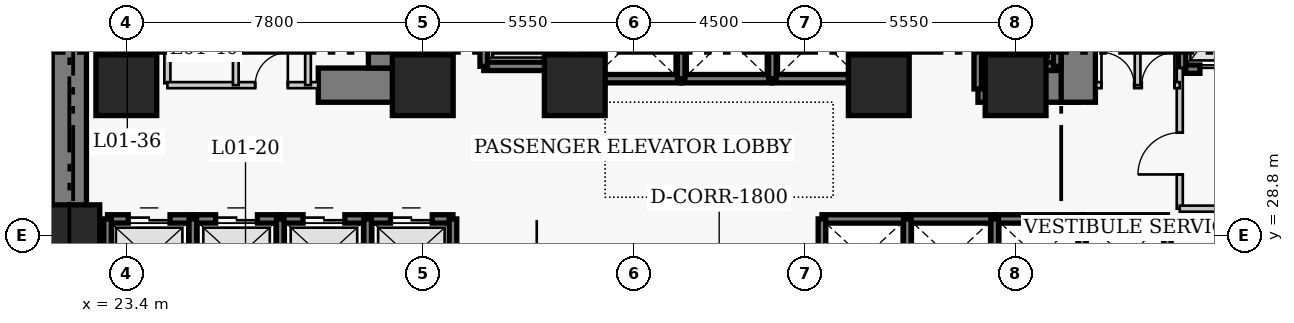
"""IFC4 building model, lengths in metres.
Left out: names, types, materials, properties, quantities, classifications, styles, units other than length and angle.
Written with IfcOpenShell. Run it as: python <this file> out.ifc"""

import sys

from ifc_helpers import new_model, si_unit, direction, frame, frame_2d, origin, origin_2d, place, context, subcontext, project, spatial, rectangle, extrude, element, fill, save


model = new_model("IFC4")
c1 = context("Model", 3, precision=1e-05, world=origin(), true_north=direction((0.0, 1.0)))
c2 = subcontext(c1, "Body", "Model", "MODEL_VIEW")
j1 = project(units=[si_unit("LENGTHUNIT", "METRE"), si_unit("PLANEANGLEUNIT", "RADIAN")], contexts=[c1])
p1 = place(None, origin())
s1 = spatial("IfcSite", under=j1, at=p1, CompositionType="ELEMENT")
p2 = place(p1, origin())
s2 = spatial("IfcBuilding", under=s1, at=p2, CompositionType="ELEMENT")
p3 = place(p2, frame((0.0, 0.0, 5.4)))
s3 = spatial("IfcBuildingStorey", under=s2, at=p3, CompositionType="ELEMENT", Elevation=5.4)
p4 = place(p3, frame((21.9, 27.05, 0.0), z_axis=(0.0, 0.0, 1.0), x_axis=(0.0, 1.0, 0.0)))
e1 = element("IfcWall", 1, at=p4, inside=s3, PredefinedType="SHEAR", context=c2, shape_type="SweptSolid", body=[
    extrude(rectangle(XDim=13.72, YDim=0.9, at=frame_2d((6.86, 0.0))), origin(), (0.0, 0.0, 1.0), 5.0),
])
p5 = place(p3, frame((28.45, 32.75, 0.0), z_axis=(0.0, 0.0, 1.0), x_axis=(1.0, 0.0, 0.0)))
e2 = element("IfcWall", 2, at=p5, inside=s3, PredefinedType="SHEAR", context=c2, shape_type="SweptSolid", body=[
    extrude(rectangle(XDim=2.4, YDim=0.9, at=frame_2d((1.2, 0.0))), origin(), (0.0, 0.0, 1.0), 5.0),
])
p6 = place(p3, frame((45.81, 32.75, 0.0), z_axis=(0.0, 0.0, 1.0), x_axis=(1.0, 0.0, 0.0)))
e3 = element("IfcWall", 3, at=p6, inside=s3, PredefinedType="SHEAR", context=c2, shape_type="SweptSolid", body=[
    extrude(rectangle(XDim=2.64, YDim=0.9, at=frame_2d((1.32, 0.0))), origin(), (0.0, 0.0, 1.0), 5.0),
])
p7 = place(p3, frame((30.22, 33.2, 0.0), z_axis=(0.0, 0.0, 1.0), x_axis=(0.0, 1.0, 0.0)))
e4 = element("IfcWall", 4, at=p7, inside=s3, PredefinedType="SHEAR", context=c2, shape_type="SweptSolid", body=[
    extrude(rectangle(XDim=7.12, YDim=0.9, at=frame_2d((3.56, 0.0))), origin(), (0.0, 0.0, 1.0), 5.0),
])
p8 = place(p3, frame((48.45, 32.3, 0.0), z_axis=(0.0, 0.0, 1.0), x_axis=(0.0, 1.0, 0.0)))
e5 = element("IfcWall", 5, at=p8, inside=s3, PredefinedType="SHEAR", context=c2, shape_type="SweptSolid", body=[
    extrude(rectangle(XDim=8.02, YDim=0.9, at=frame_2d((4.01, 0.0))), origin(), (0.0, 0.0, 1.0), 5.0),
])
p9 = place(p8, frame((5.9, 0.0, 0.0)))
e6 = element("IfcOpeningElement", 6, at=p9, cuts=e5, PredefinedType="OPENING", context=c2, shape_type="SweptSolid", body=[
    extrude(rectangle(XDim=1.1, YDim=2.15, at=frame_2d((0.55, 1.075))), frame((0.0, 0.46, 0.0), z_axis=(0.0, -1.0, 0.0), x_axis=(1.0, 0.0, 0.0)), (0.0, 0.0, 1.0), 0.92),
])
for number, where, z_axis, x_axis in (
    (7, (21.9, 28.8, 0.0), (0.0, 0.0, 1.0), (1.0, 0.0, 0.0)),
    (8, (23.4, 32.75, 0.0), (0.0, 0.0, 1.0), (1.0, 0.0, 0.0)),
    (9, (31.2, 32.75, 0.0), (0.0, 0.0, 1.0), (1.0, 0.0, 0.0)),
    (10, (35.2, 32.75, 0.0), (0.0, 0.0, 1.0), (1.0, 0.0, 0.0)),
    (11, (43.2, 32.75, 0.0), (0.0, 0.0, 1.0), (1.0, 0.0, 0.0)),
    (12, (46.8, 32.75, 0.0), (0.0, 0.0, 1.0), (1.0, 0.0, 0.0)),
):
    element("IfcColumn", number, at=place(p3, frame(where, z_axis=z_axis, x_axis=x_axis)), inside=s3, PredefinedType="COLUMN", context=c2, shape_type="SweptSolid", body=[
        extrude(rectangle(XDim=1.6, YDim=1.6, at=origin_2d()), origin(), (0.0, 0.0, 1.0), 5.0),
    ])
p10 = place(p3, frame((22.905, 29.23, 0.0), z_axis=(0.0, 0.0, 1.0), x_axis=(1.0, 0.0, 0.0)))
e13 = element("IfcWall", 13, at=p10, inside=s3, PredefinedType="SHEAR", context=c2, shape_type="SweptSolid", body=[
    extrude(rectangle(XDim=2.245, YDim=0.22, at=frame_2d((1.123, 0.0))), origin(), (0.0, 0.0, 1.0), 5.0),
])
p11 = place(p10, frame((0.545, 0.0, 0.0)))
e14 = element("IfcOpeningElement", 14, at=p11, cuts=e13, PredefinedType="OPENING", context=c2, shape_type="SweptSolid", body=[
    extrude(rectangle(XDim=1.1, YDim=2.15, at=frame_2d((0.55, 1.075))), frame((0.0, 0.12, 0.0), z_axis=(0.0, -1.0, 0.0), x_axis=(1.0, 0.0, 0.0)), (0.0, 0.0, 1.0), 0.24),
])
p12 = place(p3, frame((22.905, 27.17, 0.0), z_axis=(0.0, 0.0, 1.0), x_axis=(0.0, 1.0, 0.0)))
e15 = element("IfcWall", 15, at=p12, inside=s3, PredefinedType="SHEAR", context=c2, shape_type="SweptSolid", body=[
    extrude(rectangle(XDim=2.06, YDim=0.2, at=frame_2d((1.03, 0.0))), origin(), (0.0, 0.0, 1.0), 5.0),
])
p13 = place(p3, frame((25.15, 29.23, 0.0), z_axis=(0.0, 0.0, 1.0), x_axis=(1.0, 0.0, 0.0)))
e16 = element("IfcWall", 16, at=p13, inside=s3, PredefinedType="SHEAR", context=c2, shape_type="SweptSolid", body=[
    extrude(rectangle(XDim=2.3, YDim=0.22, at=frame_2d((1.15, 0.0))), origin(), (0.0, 0.0, 1.0), 5.0),
])
p14 = place(p13, frame((0.6, 0.0, 0.0)))
e17 = element("IfcOpeningElement", 17, at=p14, cuts=e16, PredefinedType="OPENING", context=c2, shape_type="SweptSolid", body=[
    extrude(rectangle(XDim=1.1, YDim=2.15, at=frame_2d((0.55, 1.075))), frame((0.0, 0.12, 0.0), z_axis=(0.0, -1.0, 0.0), x_axis=(1.0, 0.0, 0.0)), (0.0, 0.0, 1.0), 0.24),
])
p15 = place(p3, frame((25.15, 27.17, 0.0), z_axis=(0.0, 0.0, 1.0), x_axis=(0.0, 1.0, 0.0)))
e18 = element("IfcWall", 18, at=p15, inside=s3, PredefinedType="SHEAR", context=c2, shape_type="SweptSolid", body=[
    extrude(rectangle(XDim=2.06, YDim=0.2, at=frame_2d((1.03, 0.0))), origin(), (0.0, 0.0, 1.0), 5.0),
])
p16 = place(p3, frame((27.45, 29.23, 0.0), z_axis=(0.0, 0.0, 1.0), x_axis=(1.0, 0.0, 0.0)))
e19 = element("IfcWall", 19, at=p16, inside=s3, PredefinedType="SHEAR", context=c2, shape_type="SweptSolid", body=[
    extrude(rectangle(XDim=2.3, YDim=0.22, at=frame_2d((1.15, 0.0))), origin(), (0.0, 0.0, 1.0), 5.0),
])
p17 = place(p16, frame((0.6, 0.0, 0.0)))
e20 = element("IfcOpeningElement", 20, at=p17, cuts=e19, PredefinedType="OPENING", context=c2, shape_type="SweptSolid", body=[
    extrude(rectangle(XDim=1.1, YDim=2.15, at=frame_2d((0.55, 1.075))), frame((0.0, 0.12, 0.0), z_axis=(0.0, -1.0, 0.0), x_axis=(1.0, 0.0, 0.0)), (0.0, 0.0, 1.0), 0.24),
])
p18 = place(p3, frame((27.45, 27.17, 0.0), z_axis=(0.0, 0.0, 1.0), x_axis=(0.0, 1.0, 0.0)))
e21 = element("IfcWall", 21, at=p18, inside=s3, PredefinedType="SHEAR", context=c2, shape_type="SweptSolid", body=[
    extrude(rectangle(XDim=2.06, YDim=0.2, at=frame_2d((1.03, 0.0))), origin(), (0.0, 0.0, 1.0), 5.0),
])
p19 = place(p3, frame((29.75, 29.23, 0.0), z_axis=(0.0, 0.0, 1.0), x_axis=(1.0, 0.0, 0.0)))
e22 = element("IfcWall", 22, at=p19, inside=s3, PredefinedType="SHEAR", context=c2, shape_type="SweptSolid", body=[
    extrude(rectangle(XDim=2.245, YDim=0.22, at=frame_2d((1.123, 0.0))), origin(), (0.0, 0.0, 1.0), 5.0),
])
p20 = place(p19, frame((0.6, 0.0, 0.0)))
e23 = element("IfcOpeningElement", 23, at=p20, cuts=e22, PredefinedType="OPENING", context=c2, shape_type="SweptSolid", body=[
    extrude(rectangle(XDim=1.1, YDim=2.15, at=frame_2d((0.55, 1.075))), frame((0.0, 0.12, 0.0), z_axis=(0.0, -1.0, 0.0), x_axis=(1.0, 0.0, 0.0)), (0.0, 0.0, 1.0), 0.24),
])
for number, where, z_axis, x_axis in (
    (24, (29.75, 27.17, 0.0), (0.0, 0.0, 1.0), (0.0, 1.0, 0.0)),
    (25, (31.995, 27.17, 0.0), (0.0, 0.0, 1.0), (0.0, 1.0, 0.0)),
):
    element("IfcWall", number, at=place(p3, frame(where, z_axis=z_axis, x_axis=x_axis)), inside=s3, PredefinedType="SHEAR", context=c2, shape_type="SweptSolid", body=[
        extrude(rectangle(XDim=2.06, YDim=0.2, at=frame_2d((1.03, 0.0))), origin(), (0.0, 0.0, 1.0), 5.0),
    ])
p21 = place(p3, frame((41.705, 29.23, 0.0), z_axis=(0.0, 0.0, 1.0), x_axis=(1.0, 0.0, 0.0)))
e26 = element("IfcWall", 26, at=p21, inside=s3, PredefinedType="SHEAR", context=c2, shape_type="SweptSolid", body=[
    extrude(rectangle(XDim=2.245, YDim=0.22, at=frame_2d((1.123, 0.0))), origin(), (0.0, 0.0, 1.0), 5.0),
])
p22 = place(p3, frame((41.705, 27.17, 0.0), z_axis=(0.0, 0.0, 1.0), x_axis=(0.0, 1.0, 0.0)))
e27 = element("IfcWall", 27, at=p22, inside=s3, PredefinedType="SHEAR", context=c2, shape_type="SweptSolid", body=[
    extrude(rectangle(XDim=2.06, YDim=0.2, at=frame_2d((1.03, 0.0))), origin(), (0.0, 0.0, 1.0), 5.0),
])
p23 = place(p3, frame((43.95, 29.23, 0.0), z_axis=(0.0, 0.0, 1.0), x_axis=(1.0, 0.0, 0.0)))
e28 = element("IfcWall", 28, at=p23, inside=s3, PredefinedType="SHEAR", context=c2, shape_type="SweptSolid", body=[
    extrude(rectangle(XDim=2.3, YDim=0.22, at=frame_2d((1.15, 0.0))), origin(), (0.0, 0.0, 1.0), 5.0),
])
p24 = place(p3, frame((43.95, 27.17, 0.0), z_axis=(0.0, 0.0, 1.0), x_axis=(0.0, 1.0, 0.0)))
e29 = element("IfcWall", 29, at=p24, inside=s3, PredefinedType="SHEAR", context=c2, shape_type="SweptSolid", body=[
    extrude(rectangle(XDim=2.06, YDim=0.2, at=frame_2d((1.03, 0.0))), origin(), (0.0, 0.0, 1.0), 5.0),
])
p25 = place(p3, frame((46.25, 29.23, 0.0), z_axis=(0.0, 0.0, 1.0), x_axis=(1.0, 0.0, 0.0)))
e30 = element("IfcWall", 30, at=p25, inside=s3, PredefinedType="SHEAR", context=c2, shape_type="SweptSolid", body=[
    extrude(rectangle(XDim=2.3, YDim=0.22, at=frame_2d((1.15, 0.0))), origin(), (0.0, 0.0, 1.0), 5.0),
])
p26 = place(p3, frame((46.25, 27.17, 0.0), z_axis=(0.0, 0.0, 1.0), x_axis=(0.0, 1.0, 0.0)))
e31 = element("IfcWall", 31, at=p26, inside=s3, PredefinedType="SHEAR", context=c2, shape_type="SweptSolid", body=[
    extrude(rectangle(XDim=2.06, YDim=0.2, at=frame_2d((1.03, 0.0))), origin(), (0.0, 0.0, 1.0), 5.0),
])
p27 = place(p3, frame((48.55, 29.23, 0.0), z_axis=(0.0, 0.0, 1.0), x_axis=(1.0, 0.0, 0.0)))
e32 = element("IfcWall", 32, at=p27, inside=s3, PredefinedType="SHEAR", context=c2, shape_type="SweptSolid", body=[
    extrude(rectangle(XDim=2.245, YDim=0.22, at=frame_2d((1.123, 0.0))), origin(), (0.0, 0.0, 1.0), 5.0),
])
for number, where, z_axis, x_axis in (
    (33, (48.55, 27.17, 0.0), (0.0, 0.0, 1.0), (0.0, 1.0, 0.0)),
    (34, (50.795, 27.17, 0.0), (0.0, 0.0, 1.0), (0.0, 1.0, 0.0)),
):
    element("IfcWall", number, at=place(p3, frame(where, z_axis=z_axis, x_axis=x_axis)), inside=s3, PredefinedType="SHEAR", context=c2, shape_type="SweptSolid", body=[
        extrude(rectangle(XDim=2.06, YDim=0.2, at=frame_2d((1.03, 0.0))), origin(), (0.0, 0.0, 1.0), 5.0),
    ])
p28 = place(p3, frame((35.68, 32.92, 0.0), z_axis=(0.0, 0.0, 1.0), x_axis=(1.0, 0.0, 0.0)))
e35 = element("IfcWall", 35, at=p28, inside=s3, PredefinedType="SHEAR", context=c2, shape_type="SweptSolid", body=[
    extrude(rectangle(XDim=2.32, YDim=0.22, at=frame_2d((1.16, 0.0))), origin(), (0.0, 0.0, 1.0), 5.0),
])
p29 = place(p3, frame((35.68, 32.92, 0.0), z_axis=(0.0, 0.0, 1.0), x_axis=(0.0, 1.0, 0.0)))
e36 = element("IfcWall", 36, at=p29, inside=s3, PredefinedType="SHEAR", context=c2, shape_type="SweptSolid", body=[
    extrude(rectangle(XDim=2.16, YDim=0.2, at=frame_2d((1.08, 0.0))), origin(), (0.0, 0.0, 1.0), 5.0),
])
p30 = place(p3, frame((38.0, 32.92, 0.0), z_axis=(0.0, 0.0, 1.0), x_axis=(1.0, 0.0, 0.0)))
e37 = element("IfcWall", 37, at=p30, inside=s3, PredefinedType="SHEAR", context=c2, shape_type="SweptSolid", body=[
    extrude(rectangle(XDim=2.4, YDim=0.22, at=frame_2d((1.2, 0.0))), origin(), (0.0, 0.0, 1.0), 5.0),
])
p31 = place(p3, frame((38.0, 32.92, 0.0), z_axis=(0.0, 0.0, 1.0), x_axis=(0.0, 1.0, 0.0)))
e38 = element("IfcWall", 38, at=p31, inside=s3, PredefinedType="SHEAR", context=c2, shape_type="SweptSolid", body=[
    extrude(rectangle(XDim=2.16, YDim=0.2, at=frame_2d((1.08, 0.0))), origin(), (0.0, 0.0, 1.0), 5.0),
])
p32 = place(p3, frame((40.4, 32.92, 0.0), z_axis=(0.0, 0.0, 1.0), x_axis=(1.0, 0.0, 0.0)))
e39 = element("IfcWall", 39, at=p32, inside=s3, PredefinedType="SHEAR", context=c2, shape_type="SweptSolid", body=[
    extrude(rectangle(XDim=2.32, YDim=0.22, at=frame_2d((1.16, 0.0))), origin(), (0.0, 0.0, 1.0), 5.0),
])
for number, where, z_axis, x_axis in (
    (40, (40.4, 32.92, 0.0), (0.0, 0.0, 1.0), (0.0, 1.0, 0.0)),
    (41, (42.72, 32.92, 0.0), (0.0, 0.0, 1.0), (0.0, 1.0, 0.0)),
):
    element("IfcWall", number, at=place(p3, frame(where, z_axis=z_axis, x_axis=x_axis)), inside=s3, PredefinedType="SHEAR", context=c2, shape_type="SweptSolid", body=[
        extrude(rectangle(XDim=2.16, YDim=0.2, at=frame_2d((1.08, 0.0))), origin(), (0.0, 0.0, 1.0), 5.0),
    ])
p33 = place(p3, frame((51.18, 33.17, 0.0), z_axis=(0.0, 0.0, 1.0), x_axis=(1.0, 0.0, 0.0)))
e42 = element("IfcWall", 42, at=p33, inside=s3, PredefinedType="SHEAR", context=c2, shape_type="SweptSolid", body=[
    extrude(rectangle(XDim=2.42, YDim=0.22, at=frame_2d((1.21, 0.0))), origin(), (0.0, 0.0, 1.0), 5.0),
])
p34 = place(p33, frame((0.47, 0.0, 0.0)))
e43 = element("IfcOpeningElement", 43, at=p34, cuts=e42, PredefinedType="OPENING", context=c2, shape_type="SweptSolid", body=[
    extrude(rectangle(XDim=1.3, YDim=2.15, at=frame_2d((0.65, 1.075))), frame((0.0, 0.12, 0.0), z_axis=(0.0, -1.0, 0.0), x_axis=(1.0, 0.0, 0.0)), (0.0, 0.0, 1.0), 0.24),
])
p35 = place(p3, frame((51.18, 33.17, 0.0), z_axis=(0.0, 0.0, 1.0), x_axis=(0.0, 1.0, 0.0)))
e44 = element("IfcWall", 44, at=p35, inside=s3, PredefinedType="SHEAR", context=c2, shape_type="SweptSolid", body=[
    extrude(rectangle(XDim=2.86, YDim=0.2, at=frame_2d((1.43, 0.0))), origin(), (0.0, 0.0, 1.0), 5.0),
])
p36 = place(p3, frame((32.805, 33.245, 0.0), z_axis=(0.0, 0.0, 1.0), x_axis=(1.0, 0.0, 0.0)))
e45 = element("IfcWall", 45, at=p36, inside=s3, PredefinedType="SHEAR", context=c2, shape_type="SweptSolid", body=[
    extrude(rectangle(XDim=2.09, YDim=0.22, at=frame_2d((1.045, 0.0))), origin(), (0.0, 0.0, 1.0), 5.0),
])
for number, where, z_axis, x_axis in (
    (46, (32.805, 33.245, 0.0), (0.0, 0.0, 1.0), (0.0, 1.0, 0.0)),
    (47, (34.895, 33.245, 0.0), (0.0, 0.0, 1.0), (0.0, 1.0, 0.0)),
):
    element("IfcWall", number, at=place(p3, frame(where, z_axis=z_axis, x_axis=x_axis)), inside=s3, PredefinedType="SHEAR", context=c2, shape_type="SweptSolid", body=[
        extrude(rectangle(XDim=2.91, YDim=0.2, at=frame_2d((1.455, 0.0))), origin(), (0.0, 0.0, 1.0), 5.0),
    ])
p37 = place(p3, frame((45.805, 33.245, 0.0), z_axis=(0.0, 0.0, 1.0), x_axis=(1.0, 0.0, 0.0)))
e48 = element("IfcWall", 48, at=p37, inside=s3, PredefinedType="SHEAR", context=c2, shape_type="SweptSolid", body=[
    extrude(rectangle(XDim=2.09, YDim=0.22, at=frame_2d((1.045, 0.0))), origin(), (0.0, 0.0, 1.0), 5.0),
])
p38 = place(p3, frame((45.805, 32.65, 0.0), z_axis=(0.0, 0.0, 1.0), x_axis=(0.0, 1.0, 0.0)))
e49 = element("IfcWall", 49, at=p38, inside=s3, PredefinedType="SHEAR", context=c2, shape_type="SweptSolid", body=[
    extrude(rectangle(XDim=3.505, YDim=0.2, at=frame_2d((1.752, 0.0))), origin(), (0.0, 0.0, 1.0), 5.0),
])
p39 = place(p3, frame((47.895, 33.245, 0.0), z_axis=(0.0, 0.0, 1.0), x_axis=(0.0, 1.0, 0.0)))
e50 = element("IfcWall", 50, at=p39, inside=s3, PredefinedType="SHEAR", context=c2, shape_type="SweptSolid", body=[
    extrude(rectangle(XDim=2.91, YDim=0.2, at=frame_2d((1.455, 0.0))), origin(), (0.0, 0.0, 1.0), 5.0),
])
p40 = place(p3, frame((24.48, 32.8, 0.0), z_axis=(0.0, 0.0, 1.0), x_axis=(0.0, 1.0, 0.0)))
e51 = element("IfcWall", 51, at=p40, inside=s3, PredefinedType="PARTITIONING", context=c2, shape_type="SweptSolid", body=[
    extrude(rectangle(XDim=3.57, YDim=0.16, at=frame_2d((1.785, 0.0))), origin(), (0.0, 0.0, 1.0), 4.65),
])
p41 = place(p40, frame((1.604, 0.0, 0.0)))
e52 = element("IfcOpeningElement", 52, at=p41, cuts=e51, PredefinedType="OPENING", context=c2, shape_type="SweptSolid", body=[
    extrude(rectangle(XDim=0.9, YDim=2.1, at=frame_2d((0.45, 1.05))), frame((0.0, 0.09, 0.0), z_axis=(0.0, -1.0, 0.0), x_axis=(1.0, 0.0, 0.0)), (0.0, 0.0, 1.0), 0.18),
])
p42 = place(p3, frame((51.12, 29.5, 0.0), z_axis=(0.0, 0.0, 1.0), x_axis=(0.0, 1.0, 0.0)))
e53 = element("IfcWall", 53, at=p42, inside=s3, PredefinedType="PARTITIONING", context=c2, shape_type="SweptSolid", body=[
    extrude(rectangle(XDim=3.7, YDim=0.16, at=frame_2d((1.85, 0.0))), origin(), (0.0, 0.0, 1.0), 4.65),
])
p43 = place(p42, frame((0.9, 0.0, 0.0)))
e54 = element("IfcOpeningElement", 54, at=p43, cuts=e53, PredefinedType="OPENING", context=c2, shape_type="SweptSolid", body=[
    extrude(rectangle(XDim=1.1, YDim=2.15, at=frame_2d((0.55, 1.075))), frame((0.0, 0.09, 0.0), z_axis=(0.0, -1.0, 0.0), x_axis=(1.0, 0.0, 0.0)), (0.0, 0.0, 1.0), 0.18),
])
p44 = place(p3, frame((51.12, 29.5, 0.0), z_axis=(0.0, 0.0, 1.0), x_axis=(1.0, 0.0, 0.0)))
e55 = element("IfcWall", 55, at=p44, inside=s3, PredefinedType="PARTITIONING", context=c2, shape_type="SweptSolid", body=[
    extrude(rectangle(XDim=5.63, YDim=0.16, at=frame_2d((2.815, 0.0))), origin(), (0.0, 0.0, 1.0), 4.65),
])
p45 = place(p3, frame((24.48, 32.75, 0.0), z_axis=(0.0, 0.0, 1.0), x_axis=(1.0, 0.0, 0.0)))
e56 = element("IfcWall", 56, at=p45, inside=s3, PredefinedType="PARTITIONING", context=c2, shape_type="SweptSolid", body=[
    extrude(rectangle(XDim=3.97, YDim=0.16, at=frame_2d((1.985, 0.0))), origin(), (0.0, 0.0, 1.0), 4.65),
])
p46 = place(p45, frame((2.31, 0.0, 0.0)))
e57 = element("IfcOpeningElement", 57, at=p46, cuts=e56, PredefinedType="OPENING", context=c2, shape_type="SweptSolid", body=[
    extrude(rectangle(XDim=0.86, YDim=2.05, at=frame_2d((0.43, 1.025))), frame((0.0, 0.09, 0.0), z_axis=(0.0, -1.0, 0.0), x_axis=(1.0, 0.0, 0.0)), (0.0, 0.0, 1.0), 0.18),
])
p47 = place(p3, frame((48.92, 32.75, 0.0), z_axis=(0.0, 0.0, 1.0), x_axis=(1.0, 0.0, 0.0)))
e58 = element("IfcWall", 58, at=p47, inside=s3, PredefinedType="PARTITIONING", context=c2, shape_type="SweptSolid", body=[
    extrude(rectangle(XDim=2.2, YDim=0.16, at=frame_2d((1.1, 0.0))), origin(), (0.0, 0.0, 1.0), 4.65),
])
p48 = place(p47, frame((0.14, 0.0, 0.0)))
e59 = element("IfcOpeningElement", 59, at=p48, cuts=e58, PredefinedType="OPENING", context=c2, shape_type="SweptSolid", body=[
    extrude(rectangle(XDim=0.86, YDim=2.05, at=frame_2d((0.43, 1.025))), frame((0.0, 0.09, 0.0), z_axis=(0.0, -1.0, 0.0), x_axis=(1.0, 0.0, 0.0)), (0.0, 0.0, 1.0), 0.18),
])
p49 = place(p47, frame((1.2, 0.0, 0.0)))
e60 = element("IfcOpeningElement", 60, at=p49, cuts=e58, PredefinedType="OPENING", context=c2, shape_type="SweptSolid", body=[
    extrude(rectangle(XDim=0.86, YDim=2.05, at=frame_2d((0.43, 1.025))), frame((0.0, 0.09, 0.0), z_axis=(0.0, -1.0, 0.0), x_axis=(1.0, 0.0, 0.0)), (0.0, 0.0, 1.0), 0.18),
])
for number, where, z_axis, x_axis in (
    (61, (26.28, 32.75, 0.0), (0.0, 0.0, 1.0), (0.0, 1.0, 0.0)),
    (62, (28.18, 32.75, 0.0), (0.0, 0.0, 1.0), (0.0, 1.0, 0.0)),
    (63, (50.01, 32.75, 0.0), (0.0, 0.0, 1.0), (0.0, 1.0, 0.0)),
):
    element("IfcWall", number, at=place(p3, frame(where, z_axis=z_axis, x_axis=x_axis)), inside=s3, PredefinedType="PARTITIONING", context=c2, shape_type="SweptSolid", body=[
        extrude(rectangle(XDim=3.62, YDim=0.15, at=frame_2d((1.81, 0.0))), origin(), (0.0, 0.0, 1.0), 4.65),
    ])
p50 = place(p11, origin())
e64 = element("IfcDoor", 64, at=p50, inside=s3, OperationType="DOUBLE_DOOR_SLIDING", PredefinedType="DOOR", context=c2, shape_type="SweptSolid", body=[
    extrude(rectangle(XDim=1.1, YDim=2.15, at=frame_2d((0.55, 1.075))), frame((0.0, 0.025, 0.0), z_axis=(0.0, -1.0, 0.0), x_axis=(1.0, 0.0, 0.0)), (0.0, 0.0, 1.0), 0.05),
])
fill(e14, e64)
p51 = place(p14, origin())
e65 = element("IfcDoor", 65, at=p51, inside=s3, OperationType="DOUBLE_DOOR_SLIDING", PredefinedType="DOOR", context=c2, shape_type="SweptSolid", body=[
    extrude(rectangle(XDim=1.1, YDim=2.15, at=frame_2d((0.55, 1.075))), frame((0.0, 0.025, 0.0), z_axis=(0.0, -1.0, 0.0), x_axis=(1.0, 0.0, 0.0)), (0.0, 0.0, 1.0), 0.05),
])
fill(e17, e65)
p52 = place(p17, origin())
e66 = element("IfcDoor", 66, at=p52, inside=s3, OperationType="DOUBLE_DOOR_SLIDING", PredefinedType="DOOR", context=c2, shape_type="SweptSolid", body=[
    extrude(rectangle(XDim=1.1, YDim=2.15, at=frame_2d((0.55, 1.075))), frame((0.0, 0.025, 0.0), z_axis=(0.0, -1.0, 0.0), x_axis=(1.0, 0.0, 0.0)), (0.0, 0.0, 1.0), 0.05),
])
fill(e20, e66)
p53 = place(p20, origin())
e67 = element("IfcDoor", 67, at=p53, inside=s3, OperationType="DOUBLE_DOOR_SLIDING", PredefinedType="DOOR", context=c2, shape_type="SweptSolid", body=[
    extrude(rectangle(XDim=1.1, YDim=2.15, at=frame_2d((0.55, 1.075))), frame((0.0, 0.025, 0.0), z_axis=(0.0, -1.0, 0.0), x_axis=(1.0, 0.0, 0.0)), (0.0, 0.0, 1.0), 0.05),
])
fill(e23, e67)
p54 = place(p34, origin())
e68 = element("IfcDoor", 68, at=p54, inside=s3, OperationType="DOUBLE_DOOR_SLIDING", PredefinedType="DOOR", context=c2, shape_type="SweptSolid", body=[
    extrude(rectangle(XDim=1.3, YDim=2.15, at=frame_2d((0.65, 1.075))), frame((0.0, 0.025, 0.0), z_axis=(0.0, -1.0, 0.0), x_axis=(1.0, 0.0, 0.0)), (0.0, 0.0, 1.0), 0.05),
])
fill(e43, e68)
p55 = place(p43, origin())
e69 = element("IfcDoor", 69, at=p55, inside=s3, OperationType="SINGLE_SWING_LEFT", PredefinedType="DOOR", context=c2, shape_type="SweptSolid", body=[
    extrude(rectangle(XDim=1.1, YDim=2.15, at=frame_2d((0.55, 1.075))), frame((0.0, 0.025, 0.0), z_axis=(0.0, -1.0, 0.0), x_axis=(1.0, 0.0, 0.0)), (0.0, 0.0, 1.0), 0.05),
])
fill(e54, e69)
p56 = place(p46, origin())
e70 = element("IfcDoor", 70, at=p56, inside=s3, OperationType="SINGLE_SWING_RIGHT", PredefinedType="DOOR", context=c2, shape_type="SweptSolid", body=[
    extrude(rectangle(XDim=0.86, YDim=2.05, at=frame_2d((0.43, 1.025))), frame((0.0, 0.025, 0.0), z_axis=(0.0, -1.0, 0.0), x_axis=(1.0, 0.0, 0.0)), (0.0, 0.0, 1.0), 0.05),
])
fill(e57, e70)
p57 = place(p48, origin())
e71 = element("IfcDoor", 71, at=p57, inside=s3, OperationType="SINGLE_SWING_LEFT", PredefinedType="DOOR", context=c2, shape_type="SweptSolid", body=[
    extrude(rectangle(XDim=0.86, YDim=2.05, at=frame_2d((0.43, 1.025))), frame((0.0, 0.025, 0.0), z_axis=(0.0, -1.0, 0.0), x_axis=(1.0, 0.0, 0.0)), (0.0, 0.0, 1.0), 0.05),
])
fill(e59, e71)
p58 = place(p49, origin())
e72 = element("IfcDoor", 72, at=p58, inside=s3, OperationType="SINGLE_SWING_RIGHT", PredefinedType="DOOR", context=c2, shape_type="SweptSolid", body=[
    extrude(rectangle(XDim=0.86, YDim=2.05, at=frame_2d((0.43, 1.025))), frame((0.0, 0.025, 0.0), z_axis=(0.0, -1.0, 0.0), x_axis=(1.0, 0.0, 0.0)), (0.0, 0.0, 1.0), 0.05),
])
fill(e60, e72)
save(model, sys.argv[1])
